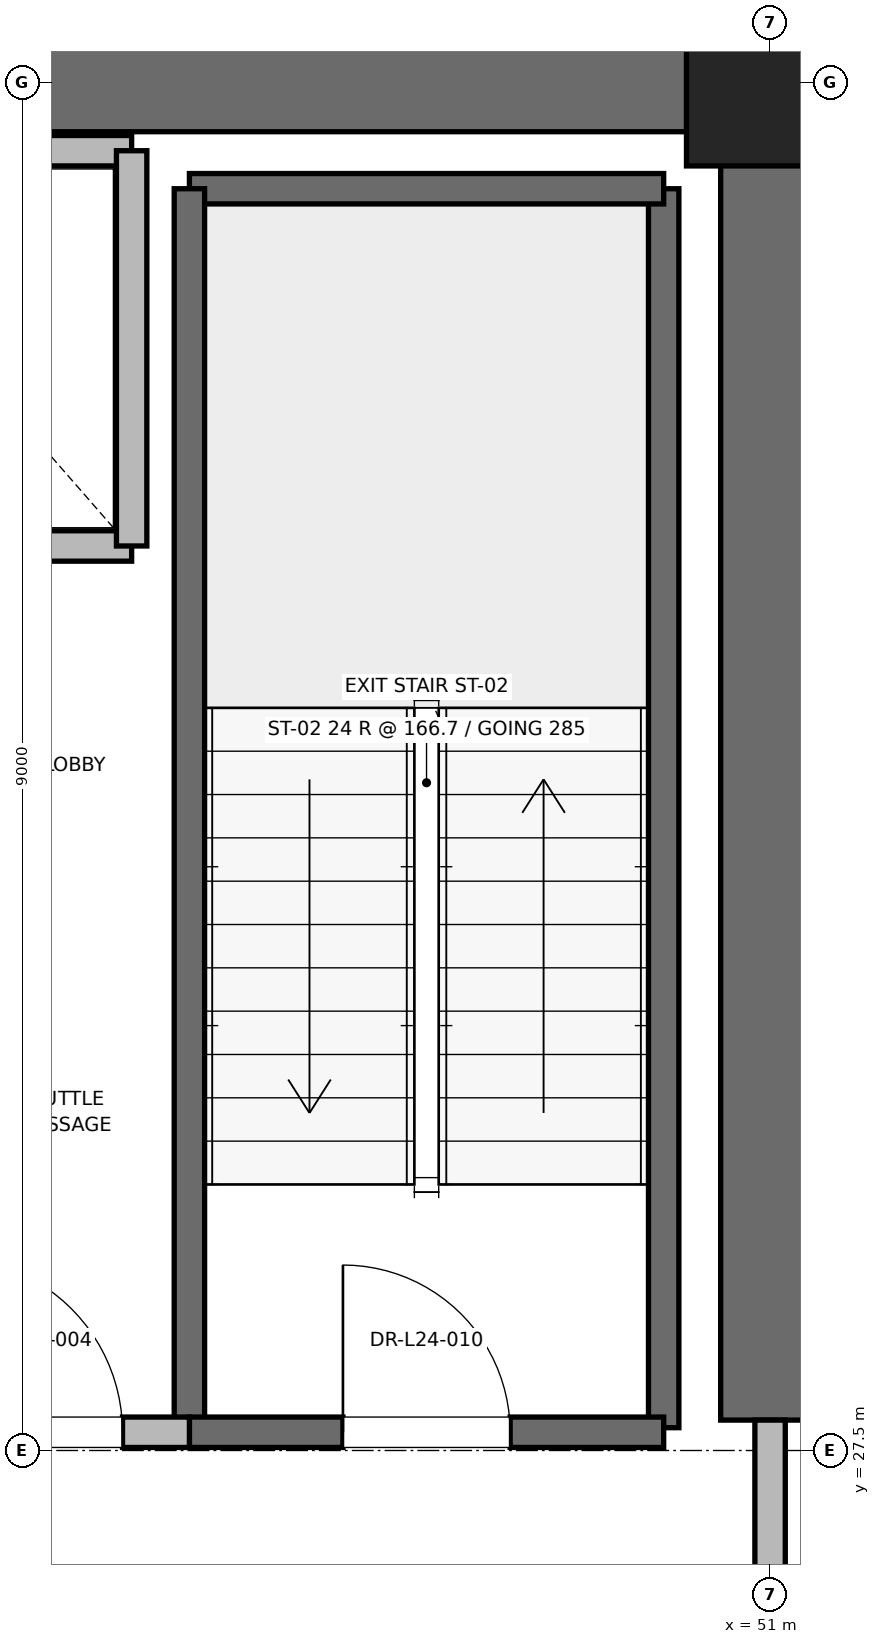
"""IFC4 building model, lengths in metres.
Left out: names, types, materials, properties, quantities, classifications, styles, units other than length and angle.
Written with IfcOpenShell. Run it as: python <this file> out.ifc"""

import sys

from ifc_helpers import new_model, si_unit, direction, frame, frame_2d, origin, origin_2d, place, context, subcontext, project, spatial, rectangle, extrude, element, fill, save


model = new_model("IFC4")
c1 = context("Model", 3, precision=1e-05, world=origin(), true_north=direction((0.0, 1.0)))
c2 = subcontext(c1, "Body", "Model", "MODEL_VIEW")
j1 = project(units=[si_unit("LENGTHUNIT", "METRE"), si_unit("PLANEANGLEUNIT", "RADIAN")], contexts=[c1])
p1 = place(None, origin())
s1 = spatial("IfcSite", under=j1, at=p1, CompositionType="ELEMENT")
p2 = place(p1, origin())
s2 = spatial("IfcBuilding", under=s1, at=p2, CompositionType="ELEMENT")
p3 = place(p2, frame((0.0, 0.0, 103.6)))
s3 = spatial("IfcBuildingStorey", under=s2, at=p3, CompositionType="ELEMENT", Elevation=103.6)
p4 = place(p3, frame((51.0, 36.5, 0.0), z_axis=(0.0, 0.0, 1.0), x_axis=(1.0, 0.0, 0.0)))
e1 = element("IfcColumn", 1, at=p4, inside=s3, PredefinedType="PILASTER", context=c2, shape_type="SweptSolid", body=[
    extrude(rectangle(XDim=1.1, YDim=1.1, at=origin_2d()), origin(), (0.0, 0.0, 1.0), 4.0),
])
p5 = place(p3, frame((45.2, 36.5, 0.0), z_axis=(0.0, 0.0, 1.0), x_axis=(1.0, 0.0, 0.0)))
e2 = element("IfcWall", 2, at=p5, inside=s3, PredefinedType="SHEAR", context=c2, shape_type="SweptSolid", body=[
    extrude(rectangle(XDim=5.8, YDim=0.65, at=frame_2d((2.9, 0.0))), origin(), (0.0, 0.0, 1.0), 3.7),
])
p6 = place(p3, frame((51.0, 27.7, 0.0), z_axis=(0.0, 0.0, 1.0), x_axis=(0.0, 1.0, 0.0)))
e3 = element("IfcWall", 3, at=p6, inside=s3, PredefinedType="SHEAR", context=c2, shape_type="SweptSolid", body=[
    extrude(rectangle(XDim=8.8, YDim=0.65, at=frame_2d((4.4, 0.0))), origin(), (0.0, 0.0, 1.0), 3.7),
])
p7 = place(p3, frame((50.3, 27.65, 0.0), z_axis=(0.0, 0.0, 1.0), x_axis=(0.0, 1.0, 0.0)))
e4 = element("IfcWall", 4, at=p7, inside=s3, PredefinedType="SOLIDWALL", context=c2, shape_type="SweptSolid", body=[
    extrude(rectangle(XDim=8.15, YDim=0.2, at=frame_2d((4.075, 0.0))), origin(), (0.0, 0.0, 1.0), 3.7),
])
p8 = place(p3, frame((47.18, 35.8, 0.0), z_axis=(0.0, 0.0, 1.0), x_axis=(1.0, 0.0, 0.0)))
e5 = element("IfcWall", 5, at=p8, inside=s3, PredefinedType="SOLIDWALL", context=c2, shape_type="SweptSolid", body=[
    extrude(rectangle(XDim=3.12, YDim=0.2, at=frame_2d((1.56, 0.0))), origin(), (0.0, 0.0, 1.0), 3.7),
])
p9 = place(p3, frame((47.18, 27.62, 0.0), z_axis=(0.0, 0.0, 1.0), x_axis=(0.0, 1.0, 0.0)))
e6 = element("IfcWall", 6, at=p9, inside=s3, PredefinedType="SOLIDWALL", context=c2, shape_type="SweptSolid", body=[
    extrude(rectangle(XDim=8.18, YDim=0.2, at=frame_2d((4.09, 0.0))), origin(), (0.0, 0.0, 1.0), 3.7),
])
p10 = place(p3, frame((47.18, 27.62, 0.0), z_axis=(0.0, 0.0, 1.0), x_axis=(1.0, 0.0, 0.0)))
e7 = element("IfcWall", 7, at=p10, inside=s3, PredefinedType="SOLIDWALL", context=c2, shape_type="SweptSolid", body=[
    extrude(rectangle(XDim=3.12, YDim=0.2, at=frame_2d((1.56, 0.0))), origin(), (0.0, 0.0, 1.0), 3.7),
])
p11 = place(p10, frame((1.01, 0.0, 0.0)))
e8 = element("IfcOpeningElement", 8, at=p11, cuts=e7, PredefinedType="OPENING", context=c2, shape_type="SweptSolid", body=[
    extrude(rectangle(XDim=1.1, YDim=2.15, at=frame_2d((0.55, 1.075))), frame((0.0, 0.1, 0.0), z_axis=(0.0, -1.0, 0.0), x_axis=(1.0, 0.0, 0.0)), (0.0, 0.0, 1.0), 0.2),
])
p12 = place(p3, frame((45.15, 27.62, 0.0), z_axis=(0.0, 0.0, 1.0), x_axis=(1.0, 0.0, 0.0)))
e9 = element("IfcWall", 9, at=p12, inside=s3, PredefinedType="PARTITIONING", context=c2, shape_type="SweptSolid", body=[
    extrude(rectangle(XDim=2.03, YDim=0.2, at=frame_2d((1.015, 0.0))), origin(), (0.0, 0.0, 1.0), 3.7),
])
p13 = place(p12, frame((0.44, 0.0, 0.0)))
e10 = element("IfcOpeningElement", 10, at=p13, cuts=e9, PredefinedType="OPENING", context=c2, shape_type="SweptSolid", body=[
    extrude(rectangle(XDim=1.15, YDim=2.2, at=frame_2d((0.575, 1.1))), frame((0.0, 0.1, 0.0), z_axis=(0.0, -1.0, 0.0), x_axis=(1.0, 0.0, 0.0)), (0.0, 0.0, 1.0), 0.2),
])
p14 = place(p3, frame((51.0, 24.3, 0.0), z_axis=(0.0, 0.0, 1.0), x_axis=(0.0, 1.0, 0.0)))
e11 = element("IfcWall", 11, at=p14, inside=s3, PredefinedType="PARTITIONING", context=c2, shape_type="SweptSolid", body=[
    extrude(rectangle(XDim=3.4, YDim=0.2, at=frame_2d((1.7, 0.0))), origin(), (0.0, 0.0, 1.0), 2.48),
])
p15 = place(p14, frame((1.125, 0.0, 0.0)))
e12 = element("IfcOpeningElement", 12, at=p15, cuts=e11, PredefinedType="OPENING", context=c2, shape_type="SweptSolid", body=[
    extrude(rectangle(XDim=1.15, YDim=2.2, at=frame_2d((0.575, 1.1))), frame((0.0, 0.1, 0.0), z_axis=(0.0, -1.0, 0.0), x_axis=(1.0, 0.0, 0.0)), (0.0, 0.0, 1.0), 0.2),
])
p16 = place(p3, frame((44.5, 33.45, 0.0), z_axis=(0.0, 0.0, 1.0), x_axis=(1.0, 0.0, 0.0)))
e13 = element("IfcWall", 13, at=p16, inside=s3, PredefinedType="SOLIDWALL", context=c2, shape_type="SweptSolid", body=[
    extrude(rectangle(XDim=2.3, YDim=0.2, at=frame_2d((1.15, 0.0))), origin(), (0.0, 0.0, 1.0), 3.7),
])
p17 = place(p3, frame((46.8, 36.05, 0.0), z_axis=(0.0, 0.0, 1.0), x_axis=(-1.0, 0.0, 0.0)))
e14 = element("IfcWall", 14, at=p17, inside=s3, PredefinedType="SOLIDWALL", context=c2, shape_type="SweptSolid", body=[
    extrude(rectangle(XDim=2.3, YDim=0.2, at=frame_2d((1.15, 0.0))), origin(), (0.0, 0.0, 1.0), 2.48),
])
p18 = place(p3, frame((46.8, 33.45, 0.0), z_axis=(0.0, 0.0, 1.0), x_axis=(0.0, 1.0, 0.0)))
e15 = element("IfcWall", 15, at=p18, inside=s3, PredefinedType="SOLIDWALL", context=c2, shape_type="SweptSolid", body=[
    extrude(rectangle(XDim=2.6, YDim=0.2, at=frame_2d((1.3, 0.0))), origin(), (0.0, 0.0, 1.0), 3.7),
])
p19 = place(p11, origin())
e16 = element("IfcDoor", 16, at=p19, inside=s3, OperationType="SINGLE_SWING_LEFT", PredefinedType="DOOR", context=c2, shape_type="SweptSolid", body=[
    extrude(rectangle(XDim=1.1, YDim=2.15, at=frame_2d((0.55, 1.075))), frame((0.0, 0.025, 0.0), z_axis=(0.0, -1.0, 0.0), x_axis=(1.0, 0.0, 0.0)), (0.0, 0.0, 1.0), 0.05),
])
fill(e8, e16)
p20 = place(p13, origin())
e17 = element("IfcDoor", 17, at=p20, inside=s3, OperationType="SINGLE_SWING_LEFT", PredefinedType="DOOR", context=c2, shape_type="SweptSolid", body=[
    extrude(rectangle(XDim=1.15, YDim=2.2, at=frame_2d((0.575, 1.1))), frame((0.0, 0.025, 0.0), z_axis=(0.0, -1.0, 0.0), x_axis=(1.0, 0.0, 0.0)), (0.0, 0.0, 1.0), 0.05),
])
fill(e10, e17)
save(model, sys.argv[1])
